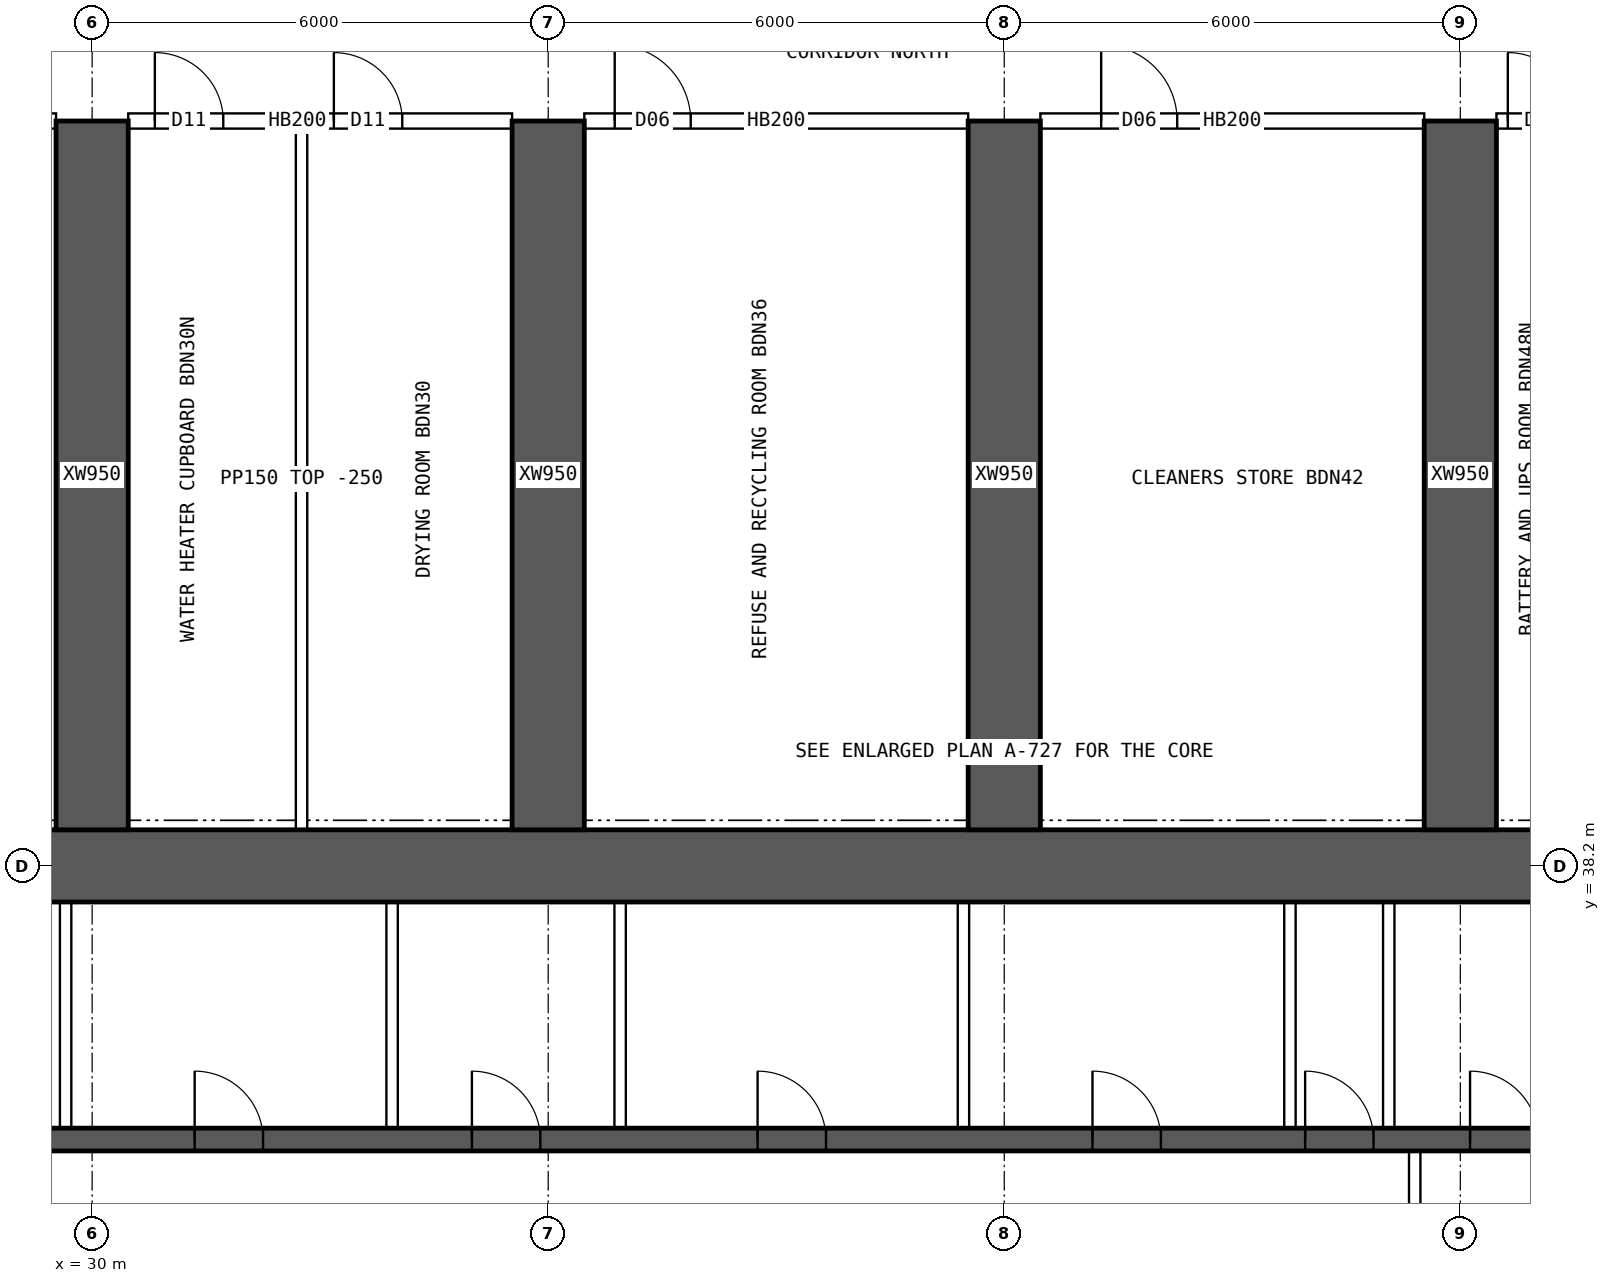
"""IFC4 building model, lengths in metres.
Left out: names, types, materials, properties, quantities, classifications, styles, units other than length and angle.
Written with IfcOpenShell. Run it as: python <this file> out.ifc"""

import sys

from ifc_helpers import new_model, si_unit, direction, frame, frame_2d, origin, place, context, subcontext, project, spatial, rectangle, extrude, element, fill, save


model = new_model("IFC4")
c1 = context("Model", 3, precision=1e-05, world=origin(), true_north=direction((0.0, 1.0)))
c2 = subcontext(c1, "Body", "Model", "MODEL_VIEW")
j1 = project(units=[si_unit("LENGTHUNIT", "METRE"), si_unit("PLANEANGLEUNIT", "RADIAN")], contexts=[c1])
p1 = place(None, origin())
s1 = spatial("IfcSite", under=j1, at=p1, CompositionType="ELEMENT")
p2 = place(p1, origin())
s2 = spatial("IfcBuilding", under=s1, at=p2, CompositionType="ELEMENT")
p3 = place(p2, frame((0.0, 0.0, 99.4)))
s3 = spatial("IfcBuildingStorey", under=s2, at=p3, CompositionType="ELEMENT", Elevation=99.4)
p4 = place(p3, frame((18.0, 38.2, 0.0), z_axis=(0.0, 0.0, 1.0), x_axis=(1.0, 0.0, 0.0)))
e1 = element("IfcWall", 1, at=p4, inside=s3, PredefinedType="SHEAR", context=c2, shape_type="SweptSolid", body=[
    extrude(rectangle(XDim=48.0, YDim=0.95, at=frame_2d((24.0, 0.0))), origin(), (0.0, 0.0, 1.0), 3.75),
])
p5 = place(p3, frame((18.475, 34.6, 0.0), z_axis=(0.0, 0.0, 1.0), x_axis=(1.0, 0.0, 0.0)))
e2 = element("IfcWall", 2, at=p5, inside=s3, PredefinedType="SHEAR", context=c2, shape_type="SweptSolid", body=[
    extrude(rectangle(XDim=47.05, YDim=0.3, at=frame_2d((23.525, 0.0))), origin(), (0.0, 0.0, 1.0), 3.75),
])
p6 = place(p5, frame((0.9, 0.0, 0.0)))
e3 = element("IfcOpeningElement", 3, at=p6, cuts=e2, PredefinedType="OPENING", context=c2, shape_type="SweptSolid", body=[
    extrude(rectangle(XDim=1.1, YDim=2.1, at=frame_2d((0.55, 1.05))), frame((0.0, 0.16, 0.0), z_axis=(0.0, -1.0, 0.0), x_axis=(1.0, 0.0, 0.0)), (0.0, 0.0, 1.0), 0.32),
])
p7 = place(p5, frame((45.05, 0.0, 0.0)))
e4 = element("IfcOpeningElement", 4, at=p7, cuts=e2, PredefinedType="OPENING", context=c2, shape_type="SweptSolid", body=[
    extrude(rectangle(XDim=1.1, YDim=2.1, at=frame_2d((0.55, 1.05))), frame((0.0, 0.16, 0.0), z_axis=(0.0, -1.0, 0.0), x_axis=(1.0, 0.0, 0.0)), (0.0, 0.0, 1.0), 0.32),
])
p8 = place(p5, frame((4.125, 0.0, 0.0)))
e5 = element("IfcOpeningElement", 5, at=p8, cuts=e2, PredefinedType="OPENING", context=c2, shape_type="SweptSolid", body=[
    extrude(rectangle(XDim=0.9, YDim=2.1, at=frame_2d((0.45, 1.05))), frame((0.0, 0.16, 0.0), z_axis=(0.0, -1.0, 0.0), x_axis=(1.0, 0.0, 0.0)), (0.0, 0.0, 1.0), 0.32),
])
p9 = place(p5, frame((42.025, 0.0, 0.0)))
e6 = element("IfcOpeningElement", 6, at=p9, cuts=e2, PredefinedType="OPENING", context=c2, shape_type="SweptSolid", body=[
    extrude(rectangle(XDim=0.9, YDim=2.1, at=frame_2d((0.45, 1.05))), frame((0.0, 0.16, 0.0), z_axis=(0.0, -1.0, 0.0), x_axis=(1.0, 0.0, 0.0)), (0.0, 0.0, 1.0), 0.32),
])
p10 = place(p5, frame((8.9, 0.0, 0.0)))
e7 = element("IfcOpeningElement", 7, at=p10, cuts=e2, PredefinedType="OPENING", context=c2, shape_type="SweptSolid", body=[
    extrude(rectangle(XDim=0.9, YDim=2.1, at=frame_2d((0.45, 1.05))), frame((0.0, 0.16, 0.0), z_axis=(0.0, -1.0, 0.0), x_axis=(1.0, 0.0, 0.0)), (0.0, 0.0, 1.0), 0.32),
])
p11 = place(p5, frame((12.874, 0.0, 0.0)))
e8 = element("IfcOpeningElement", 8, at=p11, cuts=e2, PredefinedType="OPENING", context=c2, shape_type="SweptSolid", body=[
    extrude(rectangle(XDim=0.9, YDim=2.1, at=frame_2d((0.45, 1.05))), frame((0.0, 0.16, 0.0), z_axis=(0.0, -1.0, 0.0), x_axis=(1.0, 0.0, 0.0)), (0.0, 0.0, 1.0), 0.32),
])
p12 = place(p5, frame((16.521, 0.0, 0.0)))
e9 = element("IfcOpeningElement", 9, at=p12, cuts=e2, PredefinedType="OPENING", context=c2, shape_type="SweptSolid", body=[
    extrude(rectangle(XDim=0.9, YDim=2.1, at=frame_2d((0.45, 1.05))), frame((0.0, 0.16, 0.0), z_axis=(0.0, -1.0, 0.0), x_axis=(1.0, 0.0, 0.0)), (0.0, 0.0, 1.0), 0.32),
])
p13 = place(p5, frame((20.28, 0.0, 0.0)))
e10 = element("IfcOpeningElement", 10, at=p13, cuts=e2, PredefinedType="OPENING", context=c2, shape_type="SweptSolid", body=[
    extrude(rectangle(XDim=0.9, YDim=2.1, at=frame_2d((0.45, 1.05))), frame((0.0, 0.16, 0.0), z_axis=(0.0, -1.0, 0.0), x_axis=(1.0, 0.0, 0.0)), (0.0, 0.0, 1.0), 0.32),
])
p14 = place(p5, frame((24.686, 0.0, 0.0)))
e11 = element("IfcOpeningElement", 11, at=p14, cuts=e2, PredefinedType="OPENING", context=c2, shape_type="SweptSolid", body=[
    extrude(rectangle(XDim=0.9, YDim=2.1, at=frame_2d((0.45, 1.05))), frame((0.0, 0.16, 0.0), z_axis=(0.0, -1.0, 0.0), x_axis=(1.0, 0.0, 0.0)), (0.0, 0.0, 1.0), 0.32),
])
p15 = place(p5, frame((27.483, 0.0, 0.0)))
e12 = element("IfcOpeningElement", 12, at=p15, cuts=e2, PredefinedType="OPENING", context=c2, shape_type="SweptSolid", body=[
    extrude(rectangle(XDim=0.9, YDim=2.1, at=frame_2d((0.45, 1.05))), frame((0.0, 0.16, 0.0), z_axis=(0.0, -1.0, 0.0), x_axis=(1.0, 0.0, 0.0)), (0.0, 0.0, 1.0), 0.32),
])
p16 = place(p5, frame((29.653, 0.0, 0.0)))
e13 = element("IfcOpeningElement", 13, at=p16, cuts=e2, PredefinedType="OPENING", context=c2, shape_type="SweptSolid", body=[
    extrude(rectangle(XDim=0.9, YDim=2.1, at=frame_2d((0.45, 1.05))), frame((0.0, 0.16, 0.0), z_axis=(0.0, -1.0, 0.0), x_axis=(1.0, 0.0, 0.0)), (0.0, 0.0, 1.0), 0.32),
])
p17 = place(p5, frame((33.452, 0.0, 0.0)))
e14 = element("IfcOpeningElement", 14, at=p17, cuts=e2, PredefinedType="OPENING", context=c2, shape_type="SweptSolid", body=[
    extrude(rectangle(XDim=0.9, YDim=2.1, at=frame_2d((0.45, 1.05))), frame((0.0, 0.16, 0.0), z_axis=(0.0, -1.0, 0.0), x_axis=(1.0, 0.0, 0.0)), (0.0, 0.0, 1.0), 0.32),
])
p18 = place(p5, frame((37.403, 0.0, 0.0)))
e15 = element("IfcOpeningElement", 15, at=p18, cuts=e2, PredefinedType="OPENING", context=c2, shape_type="SweptSolid", body=[
    extrude(rectangle(XDim=0.9, YDim=2.1, at=frame_2d((0.45, 1.05))), frame((0.0, 0.16, 0.0), z_axis=(0.0, -1.0, 0.0), x_axis=(1.0, 0.0, 0.0)), (0.0, 0.0, 1.0), 0.32),
])
for number, where, z_axis, x_axis in (
    (16, (30.0, 38.675, 0.0), (0.0, 0.0, 1.0), (0.0, 1.0, 0.0)),
    (17, (36.0, 38.675, 0.0), (0.0, 0.0, 1.0), (0.0, 1.0, 0.0)),
    (18, (42.0, 38.675, 0.0), (0.0, 0.0, 1.0), (0.0, 1.0, 0.0)),
    (19, (48.0, 38.675, 0.0), (0.0, 0.0, 1.0), (0.0, 1.0, 0.0)),
):
    element("IfcWall", number, at=place(p3, frame(where, z_axis=z_axis, x_axis=x_axis)), inside=s3, PredefinedType="SHEAR", context=c2, shape_type="SweptSolid", body=[
        extrude(rectangle(XDim=9.325, YDim=0.95, at=frame_2d((4.663, 0.0))), origin(), (0.0, 0.0, 1.0), 3.75),
    ])
p19 = place(p3, frame((47.4, 30.55, 0.0), z_axis=(0.0, 0.0, 1.0), x_axis=(0.0, 1.0, 0.0)))
e20 = element("IfcWall", 20, at=p19, inside=s3, PredefinedType="SOLIDWALL", context=c2, shape_type="SweptSolid", body=[
    extrude(rectangle(XDim=3.9, YDim=0.15, at=frame_2d((1.95, 0.0))), origin(), (0.0, 0.0, 1.0), 3.5),
])
p20 = place(p19, frame((1.15, 0.0, 0.0)))
e21 = element("IfcOpeningElement", 21, at=p20, cuts=e20, PredefinedType="OPENING", context=c2, shape_type="SweptSolid", body=[
    extrude(rectangle(XDim=1.6, YDim=2.1, at=frame_2d((0.8, 1.05))), frame((0.0, 0.085, 0.0), z_axis=(0.0, -1.0, 0.0), x_axis=(1.0, 0.0, 0.0)), (0.0, 0.0, 1.0), 0.17),
])
for number, where, z_axis, x_axis in (
    (22, (29.651, 34.75, 0.0), (0.0, 0.0, 1.0), (0.0, 1.0, 0.0)),
    (23, (33.946, 34.75, 0.0), (0.0, 0.0, 1.0), (0.0, 1.0, 0.0)),
    (24, (36.946, 34.75, 0.0), (0.0, 0.0, 1.0), (0.0, 1.0, 0.0)),
    (25, (41.463, 34.75, 0.0), (0.0, 0.0, 1.0), (0.0, 1.0, 0.0)),
    (26, (45.758, 34.75, 0.0), (0.0, 0.0, 1.0), (0.0, 1.0, 0.0)),
    (27, (47.058, 34.75, 0.0), (0.0, 0.0, 1.0), (0.0, 1.0, 0.0)),
):
    element("IfcWall", number, at=place(p3, frame(where, z_axis=z_axis, x_axis=x_axis)), inside=s3, PredefinedType="SOLIDWALL", context=c2, shape_type="SweptSolid", body=[
        extrude(rectangle(XDim=2.975, YDim=0.15, at=frame_2d((1.488, 0.0))), origin(), (0.0, 0.0, 1.0), 3.5),
    ])
p21 = place(p3, frame((24.475, 48.0, 0.0), z_axis=(0.0, 0.0, 1.0), x_axis=(1.0, 0.0, 0.0)))
e28 = element("IfcWall", 28, at=p21, inside=s3, PredefinedType="SOLIDWALL", context=c2, shape_type="SweptSolid", body=[
    extrude(rectangle(XDim=5.05, YDim=0.2, at=frame_2d((2.525, 0.0))), origin(), (0.0, 0.0, 1.0), 3.5),
])
p22 = place(p21, frame((0.4, 0.0, 0.0)))
e29 = element("IfcOpeningElement", 29, at=p22, cuts=e28, PredefinedType="OPENING", context=c2, shape_type="SweptSolid", body=[
    extrude(rectangle(XDim=1.0, YDim=2.1, at=frame_2d((0.5, 1.05))), frame((0.0, 0.11, 0.0), z_axis=(0.0, -1.0, 0.0), x_axis=(1.0, 0.0, 0.0)), (0.0, 0.0, 1.0), 0.22),
])
p23 = place(p3, frame((30.475, 48.0, 0.0), z_axis=(0.0, 0.0, 1.0), x_axis=(1.0, 0.0, 0.0)))
e30 = element("IfcWall", 30, at=p23, inside=s3, PredefinedType="SOLIDWALL", context=c2, shape_type="SweptSolid", body=[
    extrude(rectangle(XDim=5.05, YDim=0.2, at=frame_2d((2.525, 0.0))), origin(), (0.0, 0.0, 1.0), 3.5),
])
p24 = place(p23, frame((0.35, 0.0, 0.0)))
e31 = element("IfcOpeningElement", 31, at=p24, cuts=e30, PredefinedType="OPENING", context=c2, shape_type="SweptSolid", body=[
    extrude(rectangle(XDim=0.9, YDim=2.1, at=frame_2d((0.45, 1.05))), frame((0.0, 0.11, 0.0), z_axis=(0.0, -1.0, 0.0), x_axis=(1.0, 0.0, 0.0)), (0.0, 0.0, 1.0), 0.22),
])
p25 = place(p23, frame((2.705, 0.0, 0.0)))
e32 = element("IfcOpeningElement", 32, at=p25, cuts=e30, PredefinedType="OPENING", context=c2, shape_type="SweptSolid", body=[
    extrude(rectangle(XDim=0.9, YDim=2.1, at=frame_2d((0.45, 1.05))), frame((0.0, 0.11, 0.0), z_axis=(0.0, -1.0, 0.0), x_axis=(1.0, 0.0, 0.0)), (0.0, 0.0, 1.0), 0.22),
])
p26 = place(p3, frame((36.475, 48.0, 0.0), z_axis=(0.0, 0.0, 1.0), x_axis=(1.0, 0.0, 0.0)))
e33 = element("IfcWall", 33, at=p26, inside=s3, PredefinedType="SOLIDWALL", context=c2, shape_type="SweptSolid", body=[
    extrude(rectangle(XDim=5.05, YDim=0.2, at=frame_2d((2.525, 0.0))), origin(), (0.0, 0.0, 1.0), 3.5),
])
p27 = place(p26, frame((0.4, 0.0, 0.0)))
e34 = element("IfcOpeningElement", 34, at=p27, cuts=e33, PredefinedType="OPENING", context=c2, shape_type="SweptSolid", body=[
    extrude(rectangle(XDim=1.0, YDim=2.1, at=frame_2d((0.5, 1.05))), frame((0.0, 0.11, 0.0), z_axis=(0.0, -1.0, 0.0), x_axis=(1.0, 0.0, 0.0)), (0.0, 0.0, 1.0), 0.22),
])
p28 = place(p3, frame((42.475, 48.0, 0.0), z_axis=(0.0, 0.0, 1.0), x_axis=(1.0, 0.0, 0.0)))
e35 = element("IfcWall", 35, at=p28, inside=s3, PredefinedType="SOLIDWALL", context=c2, shape_type="SweptSolid", body=[
    extrude(rectangle(XDim=5.05, YDim=0.2, at=frame_2d((2.525, 0.0))), origin(), (0.0, 0.0, 1.0), 3.5),
])
p29 = place(p28, frame((0.8, 0.0, 0.0)))
e36 = element("IfcOpeningElement", 36, at=p29, cuts=e35, PredefinedType="OPENING", context=c2, shape_type="SweptSolid", body=[
    extrude(rectangle(XDim=1.0, YDim=2.1, at=frame_2d((0.5, 1.05))), frame((0.0, 0.11, 0.0), z_axis=(0.0, -1.0, 0.0), x_axis=(1.0, 0.0, 0.0)), (0.0, 0.0, 1.0), 0.22),
])
p30 = place(p3, frame((48.475, 48.0, 0.0), z_axis=(0.0, 0.0, 1.0), x_axis=(1.0, 0.0, 0.0)))
e37 = element("IfcWall", 37, at=p30, inside=s3, PredefinedType="SOLIDWALL", context=c2, shape_type="SweptSolid", body=[
    extrude(rectangle(XDim=5.05, YDim=0.2, at=frame_2d((2.525, 0.0))), origin(), (0.0, 0.0, 1.0), 3.5),
])
p31 = place(p30, frame((0.15, 0.0, 0.0)))
e38 = element("IfcOpeningElement", 38, at=p31, cuts=e37, PredefinedType="OPENING", context=c2, shape_type="SweptSolid", body=[
    extrude(rectangle(XDim=0.9, YDim=2.1, at=frame_2d((0.45, 1.05))), frame((0.0, 0.11, 0.0), z_axis=(0.0, -1.0, 0.0), x_axis=(1.0, 0.0, 0.0)), (0.0, 0.0, 1.0), 0.22),
])
p32 = place(p30, frame((2.335, 0.0, 0.0)))
e39 = element("IfcOpeningElement", 39, at=p32, cuts=e37, PredefinedType="OPENING", context=c2, shape_type="SweptSolid", body=[
    extrude(rectangle(XDim=0.9, YDim=2.1, at=frame_2d((0.45, 1.05))), frame((0.0, 0.11, 0.0), z_axis=(0.0, -1.0, 0.0), x_axis=(1.0, 0.0, 0.0)), (0.0, 0.0, 1.0), 0.22),
])
p33 = place(p3, frame((32.755, 38.675, 0.0), z_axis=(0.0, 0.0, 1.0), x_axis=(0.0, 1.0, 0.0)))
e40 = element("IfcWall", 40, at=p33, inside=s3, PredefinedType="PARTITIONING", context=c2, shape_type="SweptSolid", body=[
    extrude(rectangle(XDim=9.225, YDim=0.15, at=frame_2d((4.612, 0.0))), origin(), (0.0, 0.0, 1.0), 3.5),
])
p34 = place(p11, origin())
e41 = element("IfcDoor", 41, at=p34, inside=s3, OperationType="SINGLE_SWING_LEFT", PredefinedType="DOOR", context=c2, shape_type="SweptSolid", body=[
    extrude(rectangle(XDim=0.9, YDim=2.1, at=frame_2d((0.45, 1.05))), frame((0.0, 0.025, 0.0), z_axis=(0.0, -1.0, 0.0), x_axis=(1.0, 0.0, 0.0)), (0.0, 0.0, 1.0), 0.05),
])
fill(e8, e41)
p35 = place(p12, origin())
e42 = element("IfcDoor", 42, at=p35, inside=s3, OperationType="SINGLE_SWING_LEFT", PredefinedType="DOOR", context=c2, shape_type="SweptSolid", body=[
    extrude(rectangle(XDim=0.9, YDim=2.1, at=frame_2d((0.45, 1.05))), frame((0.0, 0.025, 0.0), z_axis=(0.0, -1.0, 0.0), x_axis=(1.0, 0.0, 0.0)), (0.0, 0.0, 1.0), 0.05),
])
fill(e9, e42)
p36 = place(p13, origin())
e43 = element("IfcDoor", 43, at=p36, inside=s3, OperationType="SINGLE_SWING_LEFT", PredefinedType="DOOR", context=c2, shape_type="SweptSolid", body=[
    extrude(rectangle(XDim=0.9, YDim=2.1, at=frame_2d((0.45, 1.05))), frame((0.0, 0.025, 0.0), z_axis=(0.0, -1.0, 0.0), x_axis=(1.0, 0.0, 0.0)), (0.0, 0.0, 1.0), 0.05),
])
fill(e10, e43)
p37 = place(p14, origin())
e44 = element("IfcDoor", 44, at=p37, inside=s3, OperationType="SINGLE_SWING_LEFT", PredefinedType="DOOR", context=c2, shape_type="SweptSolid", body=[
    extrude(rectangle(XDim=0.9, YDim=2.1, at=frame_2d((0.45, 1.05))), frame((0.0, 0.025, 0.0), z_axis=(0.0, -1.0, 0.0), x_axis=(1.0, 0.0, 0.0)), (0.0, 0.0, 1.0), 0.05),
])
fill(e11, e44)
p38 = place(p15, origin())
e45 = element("IfcDoor", 45, at=p38, inside=s3, OperationType="SINGLE_SWING_LEFT", PredefinedType="DOOR", context=c2, shape_type="SweptSolid", body=[
    extrude(rectangle(XDim=0.9, YDim=2.1, at=frame_2d((0.45, 1.05))), frame((0.0, 0.025, 0.0), z_axis=(0.0, -1.0, 0.0), x_axis=(1.0, 0.0, 0.0)), (0.0, 0.0, 1.0), 0.05),
])
fill(e12, e45)
p39 = place(p16, origin())
e46 = element("IfcDoor", 46, at=p39, inside=s3, OperationType="SINGLE_SWING_LEFT", PredefinedType="DOOR", context=c2, shape_type="SweptSolid", body=[
    extrude(rectangle(XDim=0.9, YDim=2.1, at=frame_2d((0.45, 1.05))), frame((0.0, 0.025, 0.0), z_axis=(0.0, -1.0, 0.0), x_axis=(1.0, 0.0, 0.0)), (0.0, 0.0, 1.0), 0.05),
])
fill(e13, e46)
p40 = place(p24, origin())
e47 = element("IfcDoor", 47, at=p40, inside=s3, OperationType="SINGLE_SWING_LEFT", PredefinedType="DOOR", context=c2, shape_type="SweptSolid", body=[
    extrude(rectangle(XDim=0.9, YDim=2.1, at=frame_2d((0.45, 1.05))), frame((0.0, 0.025, 0.0), z_axis=(0.0, -1.0, 0.0), x_axis=(1.0, 0.0, 0.0)), (0.0, 0.0, 1.0), 0.05),
])
fill(e31, e47)
p41 = place(p25, origin())
e48 = element("IfcDoor", 48, at=p41, inside=s3, OperationType="SINGLE_SWING_LEFT", PredefinedType="DOOR", context=c2, shape_type="SweptSolid", body=[
    extrude(rectangle(XDim=0.9, YDim=2.1, at=frame_2d((0.45, 1.05))), frame((0.0, 0.025, 0.0), z_axis=(0.0, -1.0, 0.0), x_axis=(1.0, 0.0, 0.0)), (0.0, 0.0, 1.0), 0.05),
])
fill(e32, e48)
p42 = place(p27, origin())
e49 = element("IfcDoor", 49, at=p42, inside=s3, OperationType="SINGLE_SWING_LEFT", PredefinedType="DOOR", context=c2, shape_type="SweptSolid", body=[
    extrude(rectangle(XDim=1.0, YDim=2.1, at=frame_2d((0.5, 1.05))), frame((0.0, 0.025, 0.0), z_axis=(0.0, -1.0, 0.0), x_axis=(1.0, 0.0, 0.0)), (0.0, 0.0, 1.0), 0.05),
])
fill(e34, e49)
p43 = place(p29, origin())
e50 = element("IfcDoor", 50, at=p43, inside=s3, OperationType="SINGLE_SWING_LEFT", PredefinedType="DOOR", context=c2, shape_type="SweptSolid", body=[
    extrude(rectangle(XDim=1.0, YDim=2.1, at=frame_2d((0.5, 1.05))), frame((0.0, 0.025, 0.0), z_axis=(0.0, -1.0, 0.0), x_axis=(1.0, 0.0, 0.0)), (0.0, 0.0, 1.0), 0.05),
])
fill(e36, e50)
p44 = place(p31, origin())
e51 = element("IfcDoor", 51, at=p44, inside=s3, OperationType="SINGLE_SWING_LEFT", PredefinedType="DOOR", context=c2, shape_type="SweptSolid", body=[
    extrude(rectangle(XDim=0.9, YDim=2.1, at=frame_2d((0.45, 1.05))), frame((0.0, 0.025, 0.0), z_axis=(0.0, -1.0, 0.0), x_axis=(1.0, 0.0, 0.0)), (0.0, 0.0, 1.0), 0.05),
])
fill(e38, e51)
save(model, sys.argv[1])
